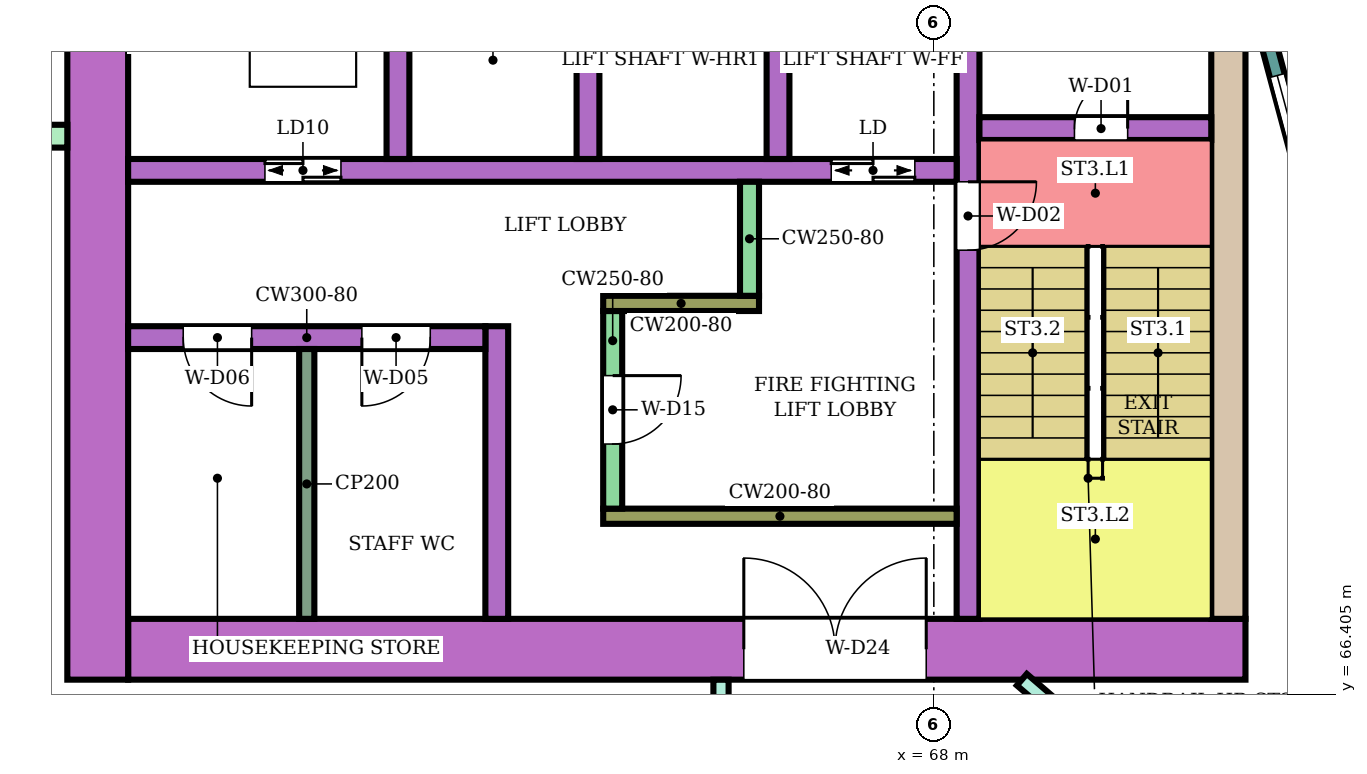
"""IFC4 building model, lengths in metres.
Left out: names, types, materials, properties, quantities, classifications, styles, units other than length and angle.
Written with IfcOpenShell. Run it as: python <this file> out.ifc"""

import sys

from ifc_helpers import new_model, si_unit, direction, frame, frame_2d, origin, place, context, subcontext, project, spatial, rectangle, extrude, element, fill, save


model = new_model("IFC4")
c1 = context("Model", 3, precision=1e-05, world=origin(), true_north=direction((0.0, 1.0)))
c2 = subcontext(c1, "Body", "Model", "MODEL_VIEW")
j1 = project(units=[si_unit("LENGTHUNIT", "METRE"), si_unit("PLANEANGLEUNIT", "RADIAN")], contexts=[c1])
p1 = place(None, origin())
s1 = spatial("IfcSite", under=j1, at=p1, CompositionType="ELEMENT")
p2 = place(p1, origin())
s2 = spatial("IfcBuilding", under=s1, at=p2, CompositionType="ELEMENT")
p3 = place(p2, frame((0.0, 0.0, 40.2)))
s3 = spatial("IfcBuildingStorey", under=s2, at=p3, CompositionType="ELEMENT", Elevation=40.2)
p4 = place(p3, frame((72.1, 67.0, 0.0), z_axis=(0.0, 0.0, 1.0), x_axis=(-1.0, 0.0, 0.0)))
e1 = element("IfcWall", 1, at=p4, inside=s3, PredefinedType="SHEAR", context=c2, shape_type="SweptSolid", body=[
    extrude(rectangle(XDim=14.7, YDim=0.8, at=frame_2d((7.35, 0.0))), origin(), (0.0, 0.0, 1.0), 3.48),
])
p5 = place(p4, frame((4.2, 0.0, 0.0)))
e2 = element("IfcOpeningElement", 2, at=p5, cuts=e1, PredefinedType="OPENING", context=c2, shape_type="SweptSolid", body=[
    extrude(rectangle(XDim=2.4, YDim=2.4, at=frame_2d((1.2, 1.2))), frame((0.0, 0.41, 0.0), z_axis=(0.0, -1.0, 0.0), x_axis=(1.0, 0.0, 0.0)), (0.0, 0.0, 1.0), 0.82),
])
p6 = place(p3, frame((71.875, 75.0, 0.0), z_axis=(0.0, 0.0, 1.0), x_axis=(0.0, -1.0, 0.0)))
e3 = element("IfcWall", 3, at=p6, inside=s3, PredefinedType="SHEAR", context=c2, shape_type="SweptSolid", body=[
    extrude(rectangle(XDim=7.6, YDim=0.45, at=frame_2d((3.8, 0.0))), origin(), (0.0, 0.0, 1.0), 3.48),
])
p7 = place(p3, frame((57.0, 83.4, 0.0), z_axis=(0.0, 0.0, 1.0), x_axis=(0.0, -1.0, 0.0)))
e4 = element("IfcWall", 4, at=p7, inside=s3, PredefinedType="SHEAR", context=c2, shape_type="SweptSolid", body=[
    extrude(rectangle(XDim=16.8, YDim=0.8, at=frame_2d((8.4, 0.0))), origin(), (0.0, 0.0, 1.0), 3.48),
])
p8 = place(p3, frame((68.45, 75.0, 0.0), z_axis=(0.0, 0.0, 1.0), x_axis=(0.0, -1.0, 0.0)))
e5 = element("IfcWall", 5, at=p8, inside=s3, PredefinedType="SHEAR", context=c2, shape_type="SweptSolid", body=[
    extrude(rectangle(XDim=7.6, YDim=0.3, at=frame_2d((3.8, 0.0))), origin(), (0.0, 0.0, 1.0), 3.48),
])
p9 = place(p8, frame((1.85, 0.0, 0.0)))
e6 = element("IfcOpeningElement", 6, at=p9, cuts=e5, PredefinedType="OPENING", context=c2, shape_type="SweptSolid", body=[
    extrude(rectangle(XDim=0.9, YDim=2.1, at=frame_2d((0.45, 1.05))), frame((0.0, 0.16, 0.0), z_axis=(0.0, -1.0, 0.0), x_axis=(1.0, 0.0, 0.0)), (0.0, 0.0, 1.0), 0.32),
])
p10 = place(p3, frame((71.65, 73.85, 0.0), z_axis=(0.0, 0.0, 1.0), x_axis=(-1.0, 0.0, 0.0)))
e7 = element("IfcWall", 7, at=p10, inside=s3, PredefinedType="SHEAR", context=c2, shape_type="SweptSolid", body=[
    extrude(rectangle(XDim=3.05, YDim=0.3, at=frame_2d((1.525, 0.0))), origin(), (0.0, 0.0, 1.0), 3.48),
])
p11 = place(p10, frame((1.1, 0.0, 0.0)))
e8 = element("IfcOpeningElement", 8, at=p11, cuts=e7, PredefinedType="OPENING", context=c2, shape_type="SweptSolid", body=[
    extrude(rectangle(XDim=0.7, YDim=2.0, at=frame_2d((0.35, 1.0))), frame((0.0, 0.16, 0.0), z_axis=(0.0, -1.0, 0.0), x_axis=(1.0, 0.0, 0.0)), (0.0, 0.0, 1.0), 0.32),
])
p12 = place(p3, frame((68.3, 73.3, 0.0), z_axis=(0.0, 0.0, 1.0), x_axis=(-1.0, 0.0, 0.0)))
e9 = element("IfcWall", 9, at=p12, inside=s3, PredefinedType="SHEAR", context=c2, shape_type="SweptSolid", body=[
    extrude(rectangle(XDim=10.9, YDim=0.3, at=frame_2d((5.45, 0.0))), origin(), (0.0, 0.0, 1.0), 3.48),
])
p13 = place(p12, frame((0.55, 0.0, 0.0)))
e10 = element("IfcOpeningElement", 10, at=p13, cuts=e9, PredefinedType="OPENING", context=c2, shape_type="SweptSolid", body=[
    extrude(rectangle(XDim=1.1, YDim=2.1, at=frame_2d((0.55, 1.05))), frame((0.0, 0.16, 0.0), z_axis=(0.0, -1.0, 0.0), x_axis=(1.0, 0.0, 0.0)), (0.0, 0.0, 1.0), 0.32),
])
p14 = place(p12, frame((8.1, 0.0, 0.0)))
e11 = element("IfcOpeningElement", 11, at=p14, cuts=e9, PredefinedType="OPENING", context=c2, shape_type="SweptSolid", body=[
    extrude(rectangle(XDim=1.0, YDim=2.1, at=frame_2d((0.5, 1.05))), frame((0.0, 0.16, 0.0), z_axis=(0.0, -1.0, 0.0), x_axis=(1.0, 0.0, 0.0)), (0.0, 0.0, 1.0), 0.32),
])
for number, where, z_axis, x_axis in (
    (12, (65.95, 76.0, 0.0), (0.0, 0.0, 1.0), (0.0, -1.0, 0.0)),
    (13, (63.45, 76.0, 0.0), (0.0, 0.0, 1.0), (0.0, -1.0, 0.0)),
    (14, (60.95, 76.0, 0.0), (0.0, 0.0, 1.0), (0.0, -1.0, 0.0)),
):
    element("IfcWall", number, at=place(p3, frame(where, z_axis=z_axis, x_axis=x_axis)), inside=s3, PredefinedType="SHEAR", context=c2, shape_type="SweptSolid", body=[
        extrude(rectangle(XDim=2.55, YDim=0.3, at=frame_2d((1.275, 0.0))), origin(), (0.0, 0.0, 1.0), 3.48),
    ])
p15 = place(p3, frame((68.3, 68.75, 0.0), z_axis=(0.0, 0.0, 1.0), x_axis=(-1.0, 0.0, 0.0)))
e15 = element("IfcWall", 15, at=p15, inside=s3, PredefinedType="SHEAR", context=c2, shape_type="SweptSolid", body=[
    extrude(rectangle(XDim=4.65, YDim=0.2, at=frame_2d((2.325, 0.0))), origin(), (0.0, 0.0, 1.0), 3.48),
])
p16 = place(p3, frame((63.775, 71.45, 0.0), z_axis=(0.0, 0.0, 1.0), x_axis=(0.0, -1.0, 0.0)))
e16 = element("IfcWall", 16, at=p16, inside=s3, PredefinedType="SHEAR", context=c2, shape_type="SweptSolid", body=[
    extrude(rectangle(XDim=2.6, YDim=0.25, at=frame_2d((1.3, 0.0))), origin(), (0.0, 0.0, 1.0), 3.48),
])
p17 = place(p16, frame((0.85, 0.0, 0.0)))
e17 = element("IfcOpeningElement", 17, at=p17, cuts=e16, PredefinedType="OPENING", context=c2, shape_type="SweptSolid", body=[
    extrude(rectangle(XDim=0.9, YDim=2.1, at=frame_2d((0.45, 1.05))), frame((0.0, 0.135, 0.0), z_axis=(0.0, -1.0, 0.0), x_axis=(1.0, 0.0, 0.0)), (0.0, 0.0, 1.0), 0.27),
])
p18 = place(p3, frame((65.7, 71.55, 0.0), z_axis=(0.0, 0.0, 1.0), x_axis=(-1.0, 0.0, 0.0)))
e18 = element("IfcWall", 18, at=p18, inside=s3, PredefinedType="SHEAR", context=c2, shape_type="SweptSolid", body=[
    extrude(rectangle(XDim=2.05, YDim=0.2, at=frame_2d((1.025, 0.0))), origin(), (0.0, 0.0, 1.0), 3.48),
])
p19 = place(p3, frame((65.575, 73.15, 0.0), z_axis=(0.0, 0.0, 1.0), x_axis=(0.0, -1.0, 0.0)))
e19 = element("IfcWall", 19, at=p19, inside=s3, PredefinedType="SHEAR", context=c2, shape_type="SweptSolid", body=[
    extrude(rectangle(XDim=1.5, YDim=0.25, at=frame_2d((0.75, 0.0))), origin(), (0.0, 0.0, 1.0), 3.48),
])
p20 = place(p3, frame((62.25, 71.25, 0.0), z_axis=(0.0, 0.0, 1.0), x_axis=(0.0, -1.0, 0.0)))
e20 = element("IfcWall", 20, at=p20, inside=s3, PredefinedType="SHEAR", context=c2, shape_type="SweptSolid", body=[
    extrude(rectangle(XDim=3.85, YDim=0.3, at=frame_2d((1.925, 0.0))), origin(), (0.0, 0.0, 1.0), 3.48),
])
p21 = place(p3, frame((62.1, 71.1, 0.0), z_axis=(0.0, 0.0, 1.0), x_axis=(-1.0, 0.0, 0.0)))
e21 = element("IfcWall", 21, at=p21, inside=s3, PredefinedType="SHEAR", context=c2, shape_type="SweptSolid", body=[
    extrude(rectangle(XDim=4.7, YDim=0.3, at=frame_2d((2.35, 0.0))), origin(), (0.0, 0.0, 1.0), 3.48),
])
p22 = place(p21, frame((0.725, 0.0, 0.0)))
e22 = element("IfcOpeningElement", 22, at=p22, cuts=e21, PredefinedType="OPENING", context=c2, shape_type="SweptSolid", body=[
    extrude(rectangle(XDim=0.9, YDim=2.1, at=frame_2d((0.45, 1.05))), frame((0.0, 0.16, 0.0), z_axis=(0.0, -1.0, 0.0), x_axis=(1.0, 0.0, 0.0)), (0.0, 0.0, 1.0), 0.32),
])
p23 = place(p21, frame((3.075, 0.0, 0.0)))
e23 = element("IfcOpeningElement", 23, at=p23, cuts=e21, PredefinedType="OPENING", context=c2, shape_type="SweptSolid", body=[
    extrude(rectangle(XDim=0.9, YDim=2.1, at=frame_2d((0.45, 1.05))), frame((0.0, 0.16, 0.0), z_axis=(0.0, -1.0, 0.0), x_axis=(1.0, 0.0, 0.0)), (0.0, 0.0, 1.0), 0.32),
])
p24 = place(p3, frame((56.6, 73.75, 0.0), z_axis=(0.0, 0.0, 1.0), x_axis=(-1.0, 0.0, 0.0)))
e24 = element("IfcWall", 24, at=p24, inside=s3, PredefinedType="NOTDEFINED", context=c2, shape_type="SweptSolid", body=[
    extrude(rectangle(XDim=2.416, YDim=0.3, at=frame_2d((1.208, 0.0))), origin(), (0.0, 0.0, 1.0), 3.8),
])
p25 = place(p3, frame((72.396, 75.0, 0.0), z_axis=(0.0, 0.0, 1.0), x_axis=(0.258789828301, -0.965933654434, 0.0)))
e25 = element("IfcWall", 25, at=p25, inside=s3, PredefinedType="NOTDEFINED", context=c2, shape_type="SweptSolid", body=[
    extrude(rectangle(XDim=3.936, YDim=0.2, at=frame_2d((1.968, 0.0))), origin(), (0.0, 0.0, 1.0), 3.8),
])
p26 = place(p25, frame((0.468, 0.0, 0.9)))
e26 = element("IfcOpeningElement", 26, at=p26, cuts=e25, PredefinedType="OPENING", context=c2, shape_type="SweptSolid", body=[
    extrude(rectangle(XDim=3.0, YDim=2.3, at=frame_2d((1.5, 1.15))), frame((0.0, 0.11, 0.0), z_axis=(0.0, -1.0, 0.0), x_axis=(1.0, 0.0, 0.0)), (0.0, 0.0, 1.0), 0.22),
])
p27 = place(p3, frame((65.2, 65.2, 0.0), z_axis=(0.0, 0.0, 1.0), x_axis=(0.0, 1.0, 0.0)))
e27 = element("IfcWall", 27, at=p27, inside=s3, PredefinedType="PARTITIONING", context=c2, shape_type="SweptSolid", body=[
    extrude(rectangle(XDim=1.399, YDim=0.2, at=frame_2d((0.7, 0.0))), origin(), (0.0, 0.0, 1.0), 3.35),
])
p28 = place(p3, frame((69.158, 66.6, 0.0), z_axis=(0.0, 0.0, 1.0), x_axis=(0.758063092745, -0.652181222835, 0.0)))
e28 = element("IfcWall", 28, at=p28, inside=s3, PredefinedType="PARTITIONING", context=c2, shape_type="SweptSolid", body=[
    extrude(rectangle(XDim=5.16, YDim=0.2, at=frame_2d((2.58, 0.0))), origin(), (0.0, 0.0, 1.0), 3.35),
])
p29 = place(p28, frame((2.165, 0.0, 0.0)))
e29 = element("IfcOpeningElement", 29, at=p29, cuts=e28, PredefinedType="OPENING", context=c2, shape_type="SweptSolid", body=[
    extrude(rectangle(XDim=0.9, YDim=2.1, at=frame_2d((0.45, 1.05))), frame((0.0, 0.11, 0.0), z_axis=(0.0, -1.0, 0.0), x_axis=(1.0, 0.0, 0.0)), (0.0, 0.0, 1.0), 0.22),
])
p30 = place(p3, frame((59.75, 70.95, 0.0), z_axis=(0.0, 0.0, 1.0), x_axis=(0.0, -1.0, 0.0)))
e30 = element("IfcWall", 30, at=p30, inside=s3, PredefinedType="PARTITIONING", context=c2, shape_type="SweptSolid", body=[
    extrude(rectangle(XDim=3.55, YDim=0.2, at=frame_2d((1.775, 0.0))), origin(), (0.0, 0.0, 1.0), 3.48),
])
p31 = place(p26, origin())
e31 = element("IfcWindow", 31, at=p31, inside=s3, PartitioningType="SINGLE_PANEL", PredefinedType="WINDOW", context=c2, shape_type="SweptSolid", body=[
    extrude(rectangle(XDim=3.0, YDim=2.3, at=frame_2d((1.5, 1.15))), frame((0.0, 0.03, 0.0), z_axis=(0.0, -1.0, 0.0), x_axis=(1.0, 0.0, 0.0)), (0.0, 0.0, 1.0), 0.06),
])
fill(e26, e31)
p32 = place(p11, frame((0.7, 0.0, 0.0), z_axis=(0.0, 0.0, 1.0), x_axis=(-1.0, 0.0, 0.0)))
e32 = element("IfcDoor", 32, at=p32, inside=s3, OperationType="SINGLE_SWING_RIGHT", PredefinedType="DOOR", context=c2, shape_type="SweptSolid", body=[
    extrude(rectangle(XDim=0.7, YDim=2.0, at=frame_2d((0.35, 1.0))), frame((0.0, 0.025, 0.0), z_axis=(0.0, -1.0, 0.0), x_axis=(1.0, 0.0, 0.0)), (0.0, 0.0, 1.0), 0.05),
])
fill(e8, e32)
p33 = place(p9, origin())
e33 = element("IfcDoor", 33, at=p33, inside=s3, OperationType="SINGLE_SWING_LEFT", PredefinedType="DOOR", context=c2, shape_type="SweptSolid", body=[
    extrude(rectangle(XDim=0.9, YDim=2.1, at=frame_2d((0.45, 1.05))), frame((0.0, 0.025, 0.0), z_axis=(0.0, -1.0, 0.0), x_axis=(1.0, 0.0, 0.0)), (0.0, 0.0, 1.0), 0.05),
])
fill(e6, e33)
p34 = place(p13, origin())
e34 = element("IfcDoor", 34, at=p34, inside=s3, OperationType="DOUBLE_DOOR_SLIDING", PredefinedType="DOOR", context=c2, shape_type="SweptSolid", body=[
    extrude(rectangle(XDim=1.1, YDim=2.1, at=frame_2d((0.55, 1.05))), frame((0.0, 0.025, 0.0), z_axis=(0.0, -1.0, 0.0), x_axis=(1.0, 0.0, 0.0)), (0.0, 0.0, 1.0), 0.05),
])
fill(e10, e34)
p35 = place(p14, origin())
e35 = element("IfcDoor", 35, at=p35, inside=s3, OperationType="DOUBLE_DOOR_SLIDING", PredefinedType="DOOR", context=c2, shape_type="SweptSolid", body=[
    extrude(rectangle(XDim=1.0, YDim=2.1, at=frame_2d((0.5, 1.05))), frame((0.0, 0.025, 0.0), z_axis=(0.0, -1.0, 0.0), x_axis=(1.0, 0.0, 0.0)), (0.0, 0.0, 1.0), 0.05),
])
fill(e11, e35)
p36 = place(p17, origin())
e36 = element("IfcDoor", 36, at=p36, inside=s3, OperationType="SINGLE_SWING_LEFT", PredefinedType="DOOR", context=c2, shape_type="SweptSolid", body=[
    extrude(rectangle(XDim=0.9, YDim=2.1, at=frame_2d((0.45, 1.05))), frame((0.0, 0.025, 0.0), z_axis=(0.0, -1.0, 0.0), x_axis=(1.0, 0.0, 0.0)), (0.0, 0.0, 1.0), 0.05),
])
fill(e17, e36)
p37 = place(p22, origin())
e37 = element("IfcDoor", 37, at=p37, inside=s3, OperationType="SINGLE_SWING_RIGHT", PredefinedType="DOOR", context=c2, shape_type="SweptSolid", body=[
    extrude(rectangle(XDim=0.9, YDim=2.1, at=frame_2d((0.45, 1.05))), frame((0.0, 0.025, 0.0), z_axis=(0.0, -1.0, 0.0), x_axis=(1.0, 0.0, 0.0)), (0.0, 0.0, 1.0), 0.05),
])
fill(e22, e37)
p38 = place(p23, origin())
e38 = element("IfcDoor", 38, at=p38, inside=s3, OperationType="SINGLE_SWING_LEFT", PredefinedType="DOOR", context=c2, shape_type="SweptSolid", body=[
    extrude(rectangle(XDim=0.9, YDim=2.1, at=frame_2d((0.45, 1.05))), frame((0.0, 0.025, 0.0), z_axis=(0.0, -1.0, 0.0), x_axis=(1.0, 0.0, 0.0)), (0.0, 0.0, 1.0), 0.05),
])
fill(e23, e38)
p39 = place(p5, frame((2.4, 0.0, 0.0), z_axis=(0.0, 0.0, 1.0), x_axis=(-1.0, 0.0, 0.0)))
e39 = element("IfcDoor", 39, at=p39, inside=s3, OperationType="DOUBLE_DOOR_SINGLE_SWING", PredefinedType="DOOR", context=c2, shape_type="SweptSolid", body=[
    extrude(rectangle(XDim=2.4, YDim=2.4, at=frame_2d((1.2, 1.2))), frame((0.0, 0.025, 0.0), z_axis=(0.0, -1.0, 0.0), x_axis=(1.0, 0.0, 0.0)), (0.0, 0.0, 1.0), 0.05),
])
fill(e2, e39)
save(model, sys.argv[1])
